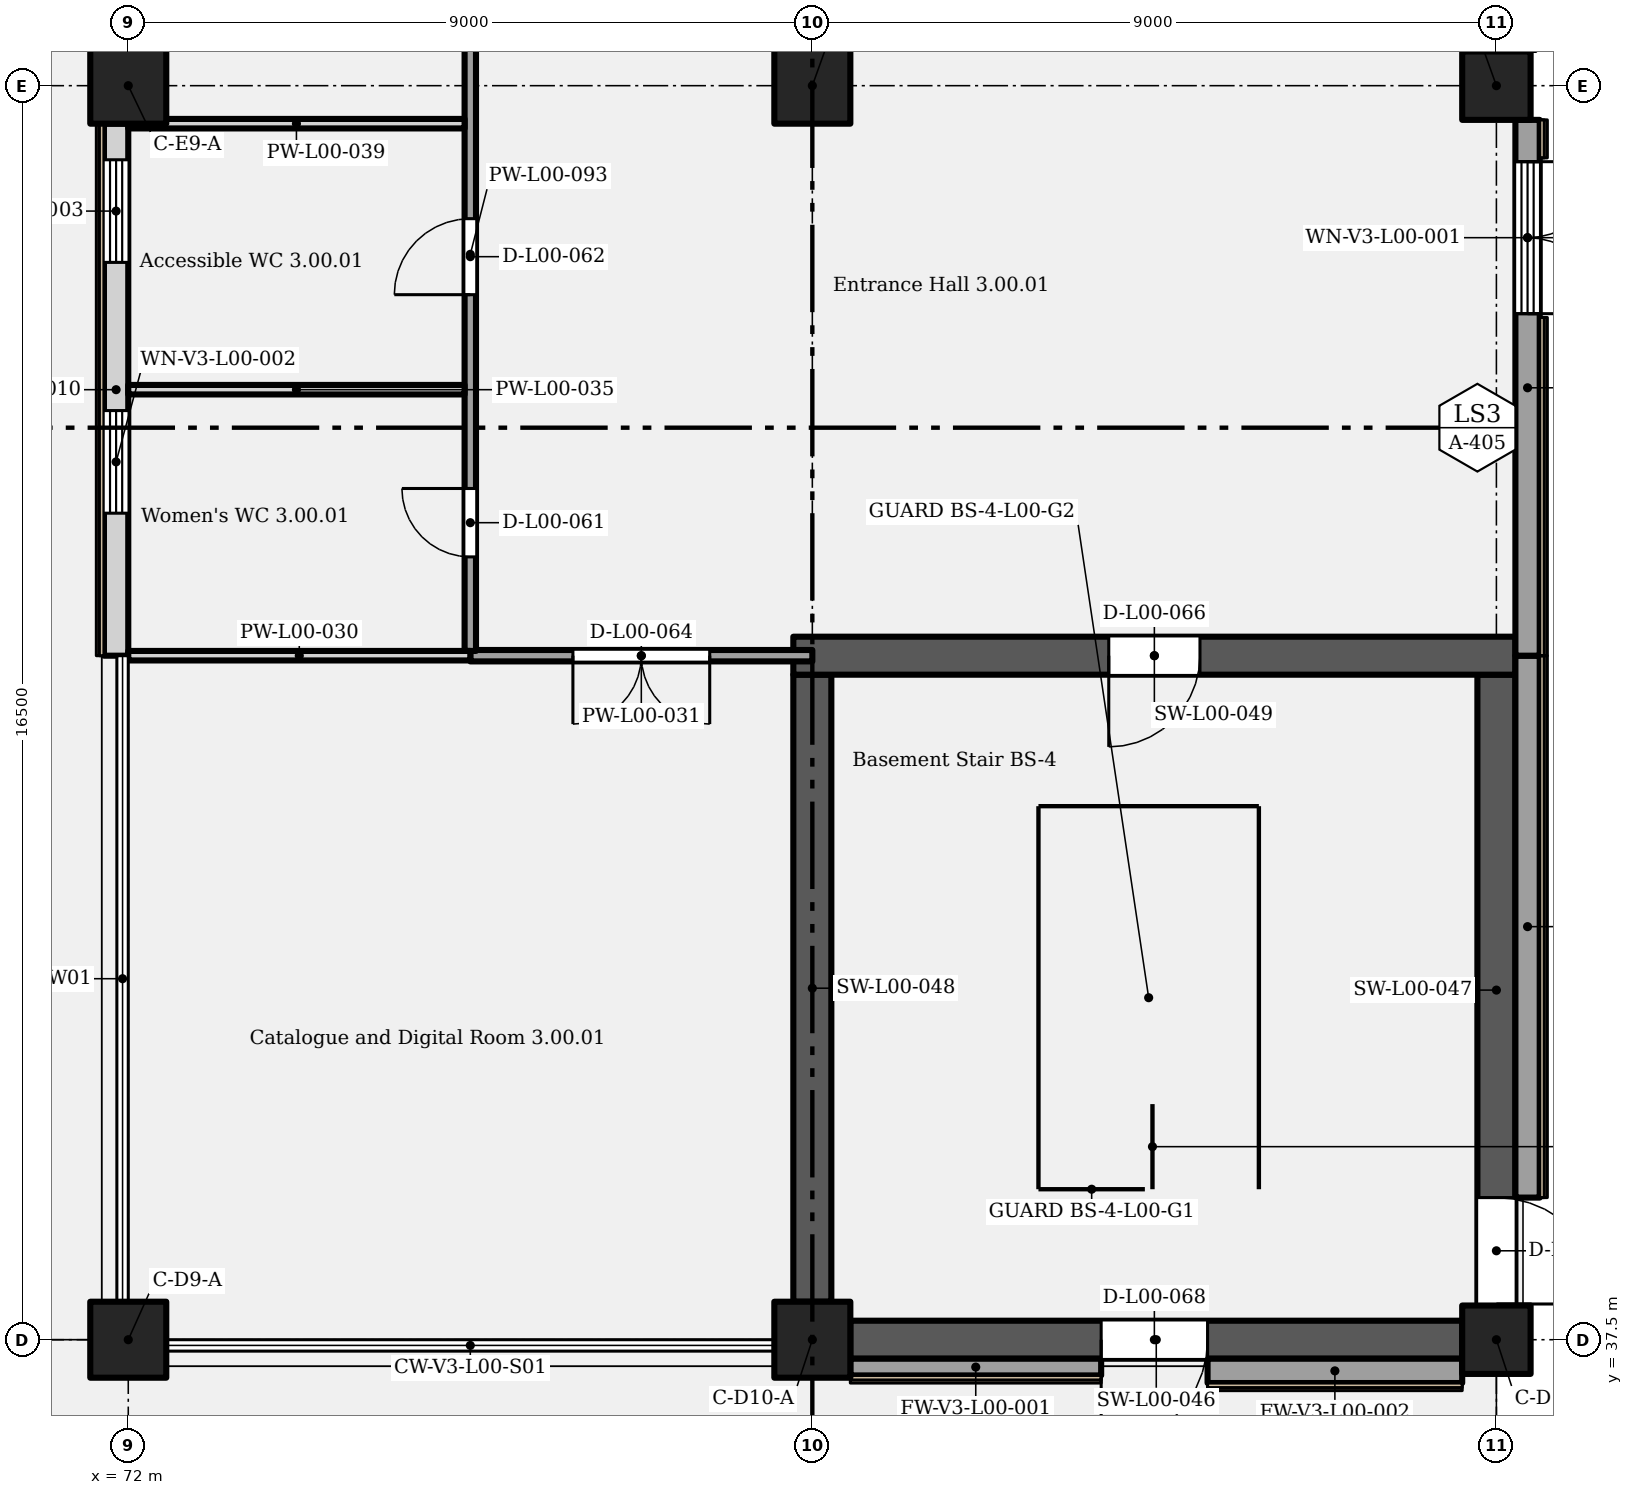
"""IFC4 building model, lengths in metres.
Left out: names, types, materials, properties, quantities, classifications, styles, units other than length and angle.
Written with IfcOpenShell. Run it as: python <this file> out.ifc"""

import sys

from ifc_helpers import new_model, si_unit, direction, frame, frame_2d, origin, origin_2d, place, context, subcontext, project, spatial, rectangle, extrude, element, fill, save


model = new_model("IFC4")
c1 = context("Model", 3, precision=1e-05, world=origin(), true_north=direction((0.0, 1.0)))
c2 = subcontext(c1, "Body", "Model", "MODEL_VIEW")
j1 = project(units=[si_unit("LENGTHUNIT", "METRE"), si_unit("PLANEANGLEUNIT", "RADIAN")], contexts=[c1])
p1 = place(None, origin())
s1 = spatial("IfcSite", under=j1, at=p1, CompositionType="ELEMENT")
p2 = place(p1, origin())
s2 = spatial("IfcBuilding", under=s1, at=p2, CompositionType="ELEMENT")
p3 = place(p2, origin())
s3 = spatial("IfcBuildingStorey", under=s2, at=p3, CompositionType="ELEMENT", Elevation=0.0)
for number, where, z_axis, x_axis in (
    (1, (72.0, 37.5, 0.0), (0.0, 0.0, 1.0), (1.0, 0.0, 0.0)),
    (2, (81.0, 37.5, 0.0), (0.0, 0.0, 1.0), (1.0, 0.0, 0.0)),
):
    element("IfcColumn", number, at=place(p3, frame(where, z_axis=z_axis, x_axis=x_axis)), inside=s3, PredefinedType="COLUMN", context=c2, shape_type="SweptSolid", body=[
        extrude(rectangle(XDim=1.0, YDim=1.0, at=origin_2d()), origin(), (0.0, 0.0, 1.0), 6.6),
    ])
p4 = place(p3, frame((90.0, 37.5, 0.0), z_axis=(0.0, 0.0, 1.0), x_axis=(1.0, 0.0, 0.0)))
e3 = element("IfcColumn", 3, at=p4, inside=s3, PredefinedType="COLUMN", context=c2, shape_type="SweptSolid", body=[
    extrude(rectangle(XDim=0.9, YDim=0.9, at=origin_2d()), origin(), (0.0, 0.0, 1.0), 6.6),
])
for number, where, z_axis, x_axis in (
    (4, (72.0, 54.0, 0.0), (0.0, 0.0, 1.0), (1.0, 0.0, 0.0)),
    (5, (81.0, 54.0, 0.0), (0.0, 0.0, 1.0), (1.0, 0.0, 0.0)),
):
    element("IfcColumn", number, at=place(p3, frame(where, z_axis=z_axis, x_axis=x_axis)), inside=s3, PredefinedType="COLUMN", context=c2, shape_type="SweptSolid", body=[
        extrude(rectangle(XDim=1.0, YDim=1.0, at=origin_2d()), origin(), (0.0, 0.0, 1.0), 6.6),
    ])
p5 = place(p3, frame((90.0, 54.0, 0.0), z_axis=(0.0, 0.0, 1.0), x_axis=(1.0, 0.0, 0.0)))
e6 = element("IfcColumn", 6, at=p5, inside=s3, PredefinedType="COLUMN", context=c2, shape_type="SweptSolid", body=[
    extrude(rectangle(XDim=0.9, YDim=0.9, at=origin_2d()), origin(), (0.0, 0.0, 1.0), 6.6),
])
p6 = place(p3, frame((81.5, 37.5, 0.0), z_axis=(0.0, 0.0, 1.0), x_axis=(1.0, 0.0, 0.0)))
e7 = element("IfcWall", 7, at=p6, inside=s3, PredefinedType="SHEAR", context=c2, shape_type="SweptSolid", body=[
    extrude(rectangle(XDim=8.05, YDim=0.5, at=frame_2d((4.025, 0.0))), origin(), (0.0, 0.0, 1.0), 6.3),
])
p7 = place(p6, frame((4.7, 0.0, 0.0), z_axis=(0.0, 0.0, 1.0), x_axis=(-1.0, 0.0, 0.0)))
e8 = element("IfcOpeningElement", 8, at=p7, cuts=e7, PredefinedType="OPENING", context=c2, shape_type="SweptSolid", body=[
    extrude(rectangle(XDim=1.4, YDim=2.1, at=frame_2d((0.7, 1.05))), frame((0.0, 0.26, 0.0), z_axis=(0.0, -1.0, 0.0), x_axis=(1.0, 0.0, 0.0)), (0.0, 0.0, 1.0), 0.52),
])
p8 = place(p3, frame((90.0, 37.95, 0.0), z_axis=(0.0, 0.0, 1.0), x_axis=(0.0, 1.0, 0.0)))
e9 = element("IfcWall", 9, at=p8, inside=s3, PredefinedType="SHEAR", context=c2, shape_type="SweptSolid", body=[
    extrude(rectangle(XDim=8.3, YDim=0.5, at=frame_2d((4.15, 0.0))), origin(), (0.0, 0.0, 1.0), 6.3),
])
p9 = place(p8, frame((1.42, 0.0, 0.0), z_axis=(0.0, 0.0, 1.0), x_axis=(-1.0, 0.0, 0.0)))
e10 = element("IfcOpeningElement", 10, at=p9, cuts=e9, PredefinedType="OPENING", context=c2, shape_type="SweptSolid", body=[
    extrude(rectangle(XDim=1.4, YDim=2.1, at=frame_2d((0.7, 1.05))), frame((0.0, 0.26, 0.0), z_axis=(0.0, -1.0, 0.0), x_axis=(1.0, 0.0, 0.0)), (0.0, 0.0, 1.0), 0.52),
])
p10 = place(p3, frame((81.0, 38.0, 0.0), z_axis=(0.0, 0.0, 1.0), x_axis=(0.0, 1.0, 0.0)))
e11 = element("IfcWall", 11, at=p10, inside=s3, PredefinedType="SHEAR", context=c2, shape_type="SweptSolid", body=[
    extrude(rectangle(XDim=8.25, YDim=0.5, at=frame_2d((4.125, 0.0))), origin(), (0.0, 0.0, 1.0), 6.3),
])
p11 = place(p3, frame((80.75, 46.5, 0.0), z_axis=(0.0, 0.0, 1.0), x_axis=(1.0, 0.0, 0.0)))
e12 = element("IfcWall", 12, at=p11, inside=s3, PredefinedType="SHEAR", context=c2, shape_type="SweptSolid", body=[
    extrude(rectangle(XDim=9.5, YDim=0.5, at=frame_2d((4.75, 0.0))), origin(), (0.0, 0.0, 1.0), 6.3),
])
p12 = place(p11, frame((5.35, 0.0, 0.0), z_axis=(0.0, 0.0, 1.0), x_axis=(-1.0, 0.0, 0.0)))
e13 = element("IfcOpeningElement", 13, at=p12, cuts=e12, PredefinedType="OPENING", context=c2, shape_type="SweptSolid", body=[
    extrude(rectangle(XDim=1.2, YDim=2.1, at=frame_2d((0.6, 1.05))), frame((0.0, 0.26, 0.0), z_axis=(0.0, -1.0, 0.0), x_axis=(1.0, 0.0, 0.0)), (0.0, 0.0, 1.0), 0.52),
])
p13 = place(p3, frame((81.5, 37.14, 0.0), z_axis=(0.0, 0.0, 1.0), x_axis=(1.0, 0.0, 0.0)))
e14 = element("IfcWall", 14, at=p13, inside=s3, PredefinedType="SOLIDWALL", context=c2, shape_type="SweptSolid", body=[
    extrude(rectangle(XDim=3.3, YDim=0.22, at=frame_2d((1.65, 0.0))), origin(), (0.0, 0.0, 1.0), 6.3),
])
p14 = place(p3, frame((86.2, 37.09, 0.0), z_axis=(0.0, 0.0, 1.0), x_axis=(1.0, 0.0, 0.0)))
e15 = element("IfcWall", 15, at=p14, inside=s3, PredefinedType="SOLIDWALL", context=c2, shape_type="SweptSolid", body=[
    extrude(rectangle(XDim=3.35, YDim=0.32, at=frame_2d((1.675, 0.0))), origin(), (0.0, 0.0, 1.0), 6.3),
])
p15 = place(p3, frame((90.41, 39.37, 0.0), z_axis=(0.0, 0.0, 1.0), x_axis=(0.0, 1.0, 0.0)))
e16 = element("IfcWall", 16, at=p15, inside=s3, PredefinedType="SOLIDWALL", context=c2, shape_type="SweptSolid", body=[
    extrude(rectangle(XDim=7.13, YDim=0.32, at=frame_2d((3.565, 0.0))), origin(), (0.0, 0.0, 1.0), 6.3),
])
p16 = place(p3, frame((90.41, 46.5, 0.0), z_axis=(0.0, 0.0, 1.0), x_axis=(0.0, 1.0, 0.0)))
e17 = element("IfcWall", 17, at=p16, inside=s3, PredefinedType="SOLIDWALL", context=c2, shape_type="SweptSolid", body=[
    extrude(rectangle(XDim=7.05, YDim=0.32, at=frame_2d((3.525, 0.0))), origin(), (0.0, 0.0, 1.0), 6.3),
])
p17 = place(p16, frame((6.5, 0.0, 0.0), z_axis=(0.0, 0.0, 1.0), x_axis=(-1.0, 0.0, 0.0)))
e18 = element("IfcOpeningElement", 18, at=p17, cuts=e17, PredefinedType="OPENING", context=c2, shape_type="SweptSolid", body=[
    extrude(rectangle(XDim=2.0, YDim=2.1, at=frame_2d((1.0, 1.05))), frame((0.0, 0.17, 0.0), z_axis=(0.0, -1.0, 0.0), x_axis=(1.0, 0.0, 0.0)), (0.0, 0.0, 1.0), 0.34),
])
p18 = place(p16, frame((4.5, 0.0, 2.25)))
e19 = element("IfcOpeningElement", 19, at=p18, cuts=e17, PredefinedType="OPENING", context=c2, shape_type="SweptSolid", body=[
    extrude(rectangle(XDim=2.0, YDim=0.8, at=frame_2d((1.0, 0.4))), frame((0.0, 0.17, 0.0), z_axis=(0.0, -1.0, 0.0), x_axis=(1.0, 0.0, 0.0)), (0.0, 0.0, 1.0), 0.34),
])
p19 = place(p3, frame((71.84, 46.5, 0.0), z_axis=(0.0, 0.0, 1.0), x_axis=(0.0, 1.0, 0.0)))
e20 = element("IfcWall", 20, at=p19, inside=s3, PredefinedType="SOLIDWALL", context=c2, shape_type="SweptSolid", body=[
    extrude(rectangle(XDim=7.0, YDim=0.32, at=frame_2d((3.5, 0.0))), origin(), (0.0, 0.0, 1.0), 6.3),
])
p20 = place(p19, frame((1.875, 0.0, 1.2)))
e21 = element("IfcOpeningElement", 21, at=p20, cuts=e20, PredefinedType="OPENING", context=c2, shape_type="SweptSolid", body=[
    extrude(rectangle(XDim=1.35, YDim=2.55, at=frame_2d((0.675, 1.275))), frame((0.0, 0.17, 0.0), z_axis=(0.0, -1.0, 0.0), x_axis=(1.0, 0.0, 0.0)), (0.0, 0.0, 1.0), 0.34),
])
p21 = place(p19, frame((5.175, 0.0, 1.2)))
e22 = element("IfcOpeningElement", 22, at=p21, cuts=e20, PredefinedType="OPENING", context=c2, shape_type="SweptSolid", body=[
    extrude(rectangle(XDim=1.35, YDim=2.55, at=frame_2d((0.675, 1.275))), frame((0.0, 0.17, 0.0), z_axis=(0.0, -1.0, 0.0), x_axis=(1.0, 0.0, 0.0)), (0.0, 0.0, 1.0), 0.34),
])
p22 = place(p3, frame((72.0, 46.5, 0.0), z_axis=(0.0, 0.0, 1.0), x_axis=(1.0, 0.0, 0.0)))
e23 = element("IfcWall", 23, at=p22, inside=s3, PredefinedType="PARTITIONING", context=c2, shape_type="SweptSolid", body=[
    extrude(rectangle(XDim=4.5, YDim=0.125, at=frame_2d((2.25, 0.0))), origin(), (0.0, 0.0, 1.0), 6.3),
])
p23 = place(p3, frame((76.5, 46.5, 0.0), z_axis=(0.0, 0.0, 1.0), x_axis=(1.0, 0.0, 0.0)))
e24 = element("IfcWall", 24, at=p23, inside=s3, PredefinedType="PARTITIONING", context=c2, shape_type="SweptSolid", body=[
    extrude(rectangle(XDim=4.5, YDim=0.15, at=frame_2d((2.25, 0.0))), origin(), (0.0, 0.0, 1.0), 6.3),
])
p24 = place(p23, frame((3.15, 0.0, 0.0), z_axis=(0.0, 0.0, 1.0), x_axis=(-1.0, 0.0, 0.0)))
e25 = element("IfcOpeningElement", 25, at=p24, cuts=e24, PredefinedType="OPENING", context=c2, shape_type="SweptSolid", body=[
    extrude(rectangle(XDim=1.8, YDim=2.4, at=frame_2d((0.9, 1.2))), frame((0.0, 0.085, 0.0), z_axis=(0.0, -1.0, 0.0), x_axis=(1.0, 0.0, 0.0)), (0.0, 0.0, 1.0), 0.17),
])
for number, where, z_axis, x_axis in (
    (26, (72.0, 50.0, 0.0), (0.0, 0.0, 1.0), (1.0, 0.0, 0.0)),
    (27, (72.0, 53.5, 0.0), (0.0, 0.0, 1.0), (1.0, 0.0, 0.0)),
):
    element("IfcWall", number, at=place(p3, frame(where, z_axis=z_axis, x_axis=x_axis)), inside=s3, PredefinedType="PARTITIONING", context=c2, shape_type="SweptSolid", body=[
        extrude(rectangle(XDim=4.425, YDim=0.125, at=frame_2d((2.212, 0.0))), origin(), (0.0, 0.0, 1.0), 6.3),
    ])
p25 = place(p3, frame((76.5, 46.562, 0.0), z_axis=(0.0, 0.0, 1.0), x_axis=(0.0, 1.0, 0.0)))
e28 = element("IfcWall", 28, at=p25, inside=s3, PredefinedType="PARTITIONING", context=c2, shape_type="SweptSolid", body=[
    extrude(rectangle(XDim=10.438, YDim=0.15, at=frame_2d((5.219, 0.0))), origin(), (0.0, 0.0, 1.0), 6.3),
])
p26 = place(p25, frame((1.238, 0.0, 0.0)))
e29 = element("IfcOpeningElement", 29, at=p26, cuts=e28, PredefinedType="OPENING", context=c2, shape_type="SweptSolid", body=[
    extrude(rectangle(XDim=0.9, YDim=2.1, at=frame_2d((0.45, 1.05))), frame((0.0, 0.085, 0.0), z_axis=(0.0, -1.0, 0.0), x_axis=(1.0, 0.0, 0.0)), (0.0, 0.0, 1.0), 0.17),
])
p27 = place(p25, frame((4.688, 0.0, 0.0)))
e30 = element("IfcOpeningElement", 30, at=p27, cuts=e28, PredefinedType="OPENING", context=c2, shape_type="SweptSolid", body=[
    extrude(rectangle(XDim=1.0, YDim=2.1, at=frame_2d((0.5, 1.05))), frame((0.0, 0.085, 0.0), z_axis=(0.0, -1.0, 0.0), x_axis=(1.0, 0.0, 0.0)), (0.0, 0.0, 1.0), 0.17),
])
p28 = place(p25, frame((8.238, 0.0, 0.0)))
e31 = element("IfcOpeningElement", 31, at=p28, cuts=e28, PredefinedType="OPENING", context=c2, shape_type="SweptSolid", body=[
    extrude(rectangle(XDim=0.9, YDim=2.1, at=frame_2d((0.45, 1.05))), frame((0.0, 0.085, 0.0), z_axis=(0.0, -1.0, 0.0), x_axis=(1.0, 0.0, 0.0)), (0.0, 0.0, 1.0), 0.17),
])
p29 = place(p7, origin())
e32 = element("IfcDoor", 32, at=p29, inside=s3, OperationType="SINGLE_SWING_LEFT", PredefinedType="DOOR", context=c2, shape_type="SweptSolid", body=[
    extrude(rectangle(XDim=1.4, YDim=2.1, at=frame_2d((0.7, 1.05))), frame((0.0, 0.025, 0.0), z_axis=(0.0, -1.0, 0.0), x_axis=(1.0, 0.0, 0.0)), (0.0, 0.0, 1.0), 0.05),
])
fill(e8, e32)
p30 = place(p9, origin())
e33 = element("IfcDoor", 33, at=p30, inside=s3, OperationType="SINGLE_SWING_LEFT", PredefinedType="DOOR", context=c2, shape_type="SweptSolid", body=[
    extrude(rectangle(XDim=1.4, YDim=2.1, at=frame_2d((0.7, 1.05))), frame((0.0, 0.025, 0.0), z_axis=(0.0, -1.0, 0.0), x_axis=(1.0, 0.0, 0.0)), (0.0, 0.0, 1.0), 0.05),
])
fill(e10, e33)
p31 = place(p17, origin())
e34 = element("IfcDoor", 34, at=p31, inside=s3, OperationType="DOUBLE_DOOR_SINGLE_SWING", PredefinedType="DOOR", context=c2, shape_type="SweptSolid", body=[
    extrude(rectangle(XDim=2.0, YDim=2.1, at=frame_2d((1.0, 1.05))), frame((0.0, 0.025, 0.0), z_axis=(0.0, -1.0, 0.0), x_axis=(1.0, 0.0, 0.0)), (0.0, 0.0, 1.0), 0.05),
])
fill(e18, e34)
p32 = place(p18, origin())
e35 = element("IfcWindow", 35, at=p32, inside=s3, PartitioningType="SINGLE_PANEL", PredefinedType="WINDOW", context=c2, shape_type="SweptSolid", body=[
    extrude(rectangle(XDim=2.0, YDim=0.8, at=frame_2d((1.0, 0.4))), frame((0.0, 0.03, 0.0), z_axis=(0.0, -1.0, 0.0), x_axis=(1.0, 0.0, 0.0)), (0.0, 0.0, 1.0), 0.06),
])
fill(e19, e35)
p33 = place(p20, origin())
e36 = element("IfcWindow", 36, at=p33, inside=s3, PartitioningType="SINGLE_PANEL", PredefinedType="WINDOW", context=c2, shape_type="SweptSolid", body=[
    extrude(rectangle(XDim=1.35, YDim=2.55, at=frame_2d((0.675, 1.275))), frame((0.0, 0.03, 0.0), z_axis=(0.0, -1.0, 0.0), x_axis=(1.0, 0.0, 0.0)), (0.0, 0.0, 1.0), 0.06),
])
fill(e21, e36)
p34 = place(p21, origin())
e37 = element("IfcWindow", 37, at=p34, inside=s3, PartitioningType="SINGLE_PANEL", PredefinedType="WINDOW", context=c2, shape_type="SweptSolid", body=[
    extrude(rectangle(XDim=1.35, YDim=2.55, at=frame_2d((0.675, 1.275))), frame((0.0, 0.03, 0.0), z_axis=(0.0, -1.0, 0.0), x_axis=(1.0, 0.0, 0.0)), (0.0, 0.0, 1.0), 0.06),
])
fill(e22, e37)
p35 = place(p26, origin())
e38 = element("IfcDoor", 38, at=p35, inside=s3, OperationType="SINGLE_SWING_RIGHT", PredefinedType="DOOR", context=c2, shape_type="SweptSolid", body=[
    extrude(rectangle(XDim=0.9, YDim=2.1, at=frame_2d((0.45, 1.05))), frame((0.0, 0.025, 0.0), z_axis=(0.0, -1.0, 0.0), x_axis=(1.0, 0.0, 0.0)), (0.0, 0.0, 1.0), 0.05),
])
fill(e29, e38)
p36 = place(p27, origin())
e39 = element("IfcDoor", 39, at=p36, inside=s3, OperationType="SINGLE_SWING_LEFT", PredefinedType="DOOR", context=c2, shape_type="SweptSolid", body=[
    extrude(rectangle(XDim=1.0, YDim=2.1, at=frame_2d((0.5, 1.05))), frame((0.0, 0.025, 0.0), z_axis=(0.0, -1.0, 0.0), x_axis=(1.0, 0.0, 0.0)), (0.0, 0.0, 1.0), 0.05),
])
fill(e30, e39)
p37 = place(p24, origin())
e40 = element("IfcDoor", 40, at=p37, inside=s3, OperationType="DOUBLE_DOOR_SINGLE_SWING", PredefinedType="DOOR", context=c2, shape_type="SweptSolid", body=[
    extrude(rectangle(XDim=1.8, YDim=2.4, at=frame_2d((0.9, 1.2))), frame((0.0, 0.025, 0.0), z_axis=(0.0, -1.0, 0.0), x_axis=(1.0, 0.0, 0.0)), (0.0, 0.0, 1.0), 0.05),
])
fill(e25, e40)
p38 = place(p12, origin())
e41 = element("IfcDoor", 41, at=p38, inside=s3, OperationType="SINGLE_SWING_RIGHT", PredefinedType="DOOR", context=c2, shape_type="SweptSolid", body=[
    extrude(rectangle(XDim=1.2, YDim=2.1, at=frame_2d((0.6, 1.05))), frame((0.0, 0.025, 0.0), z_axis=(0.0, -1.0, 0.0), x_axis=(1.0, 0.0, 0.0)), (0.0, 0.0, 1.0), 0.05),
])
fill(e13, e41)
save(model, sys.argv[1])
